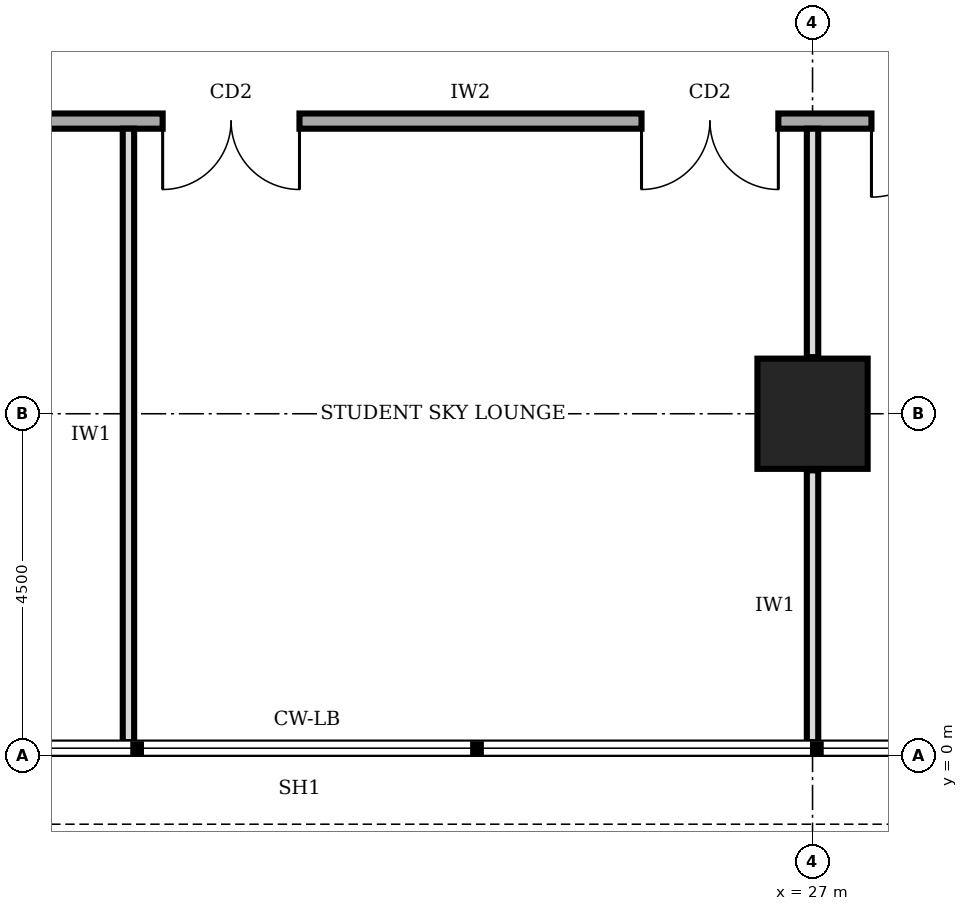
"""IFC4 building model, lengths in metres.
Left out: names, types, materials, properties, quantities, classifications, styles, units other than length and angle.
Written with IfcOpenShell. Run it as: python <this file> out.ifc"""

import sys

from ifc_helpers import new_model, si_unit, direction, frame, frame_2d, origin, origin_2d, place, context, subcontext, project, spatial, rectangle, extrude, element, fill, save


model = new_model("IFC4")
c1 = context("Model", 3, precision=1e-05, world=origin(), true_north=direction((0.0, 1.0)))
c2 = subcontext(c1, "Body", "Model", "MODEL_VIEW")
j1 = project(units=[si_unit("LENGTHUNIT", "METRE"), si_unit("PLANEANGLEUNIT", "RADIAN")], contexts=[c1])
p1 = place(None, origin())
s1 = spatial("IfcSite", under=j1, at=p1, CompositionType="ELEMENT")
p2 = place(p1, origin())
s2 = spatial("IfcBuilding", under=s1, at=p2, CompositionType="ELEMENT")
p3 = place(p2, frame((0.0, 0.0, 269.0)))
s3 = spatial("IfcBuildingStorey", under=s2, at=p3, CompositionType="ELEMENT", Elevation=269.0)
p4 = place(p3, frame((27.0, 4.5, 0.0), z_axis=(0.0, 0.0, 1.0), x_axis=(1.0, 0.0, 0.0)))
e1 = element("IfcColumn", 1, at=p4, inside=s3, PredefinedType="COLUMN", context=c2, shape_type="SweptSolid", body=[
    extrude(rectangle(XDim=1.45, YDim=1.45, at=origin_2d()), origin(), (0.0, 0.0, 1.0), 4.0),
])
p5 = place(p3, frame((11.9, 8.35, 0.0), z_axis=(0.0, 0.0, 1.0), x_axis=(1.0, 0.0, 0.0)))
e2 = element("IfcWall", 2, at=p5, inside=s3, PredefinedType="SOLIDWALL", context=c2, shape_type="SweptSolid", body=[
    extrude(rectangle(XDim=17.65, YDim=0.2, at=frame_2d((8.825, 0.0))), origin(), (0.0, 0.0, 1.0), 3.75),
])
p6 = place(p5, frame((2.05, 0.0, 0.0)))
e3 = element("IfcOpeningElement", 3, at=p6, cuts=e2, PredefinedType="OPENING", context=c2, shape_type="SweptSolid", body=[
    extrude(rectangle(XDim=1.8, YDim=2.1, at=frame_2d((0.9, 1.05))), frame((0.0, 0.11, 0.0), z_axis=(0.0, -1.0, 0.0), x_axis=(1.0, 0.0, 0.0)), (0.0, 0.0, 1.0), 0.22),
])
p7 = place(p5, frame((6.55, 0.0, 0.0)))
e4 = element("IfcOpeningElement", 4, at=p7, cuts=e2, PredefinedType="OPENING", context=c2, shape_type="SweptSolid", body=[
    extrude(rectangle(XDim=1.8, YDim=2.1, at=frame_2d((0.9, 1.05))), frame((0.0, 0.11, 0.0), z_axis=(0.0, -1.0, 0.0), x_axis=(1.0, 0.0, 0.0)), (0.0, 0.0, 1.0), 0.22),
])
p8 = place(p5, frame((12.85, 0.0, 0.0)))
e5 = element("IfcOpeningElement", 5, at=p8, cuts=e2, PredefinedType="OPENING", context=c2, shape_type="SweptSolid", body=[
    extrude(rectangle(XDim=1.8, YDim=2.1, at=frame_2d((0.9, 1.05))), frame((0.0, 0.11, 0.0), z_axis=(0.0, -1.0, 0.0), x_axis=(1.0, 0.0, 0.0)), (0.0, 0.0, 1.0), 0.22),
])
p9 = place(p5, frame((15.875, 0.0, 0.0)))
e6 = element("IfcOpeningElement", 6, at=p9, cuts=e2, PredefinedType="OPENING", context=c2, shape_type="SweptSolid", body=[
    extrude(rectangle(XDim=1.0, YDim=2.1, at=frame_2d((0.5, 1.05))), frame((0.0, 0.11, 0.0), z_axis=(0.0, -1.0, 0.0), x_axis=(1.0, 0.0, 0.0)), (0.0, 0.0, 1.0), 0.22),
])
p10 = place(p3, frame((18.0, 0.18, 0.0), z_axis=(0.0, 0.0, 1.0), x_axis=(0.0, 1.0, 0.0)))
e7 = element("IfcWall", 7, at=p10, inside=s3, PredefinedType="PARTITIONING", context=c2, shape_type="SweptSolid", body=[
    extrude(rectangle(XDim=8.07, YDim=0.15, at=frame_2d((4.035, 0.0))), origin(), (0.0, 0.0, 1.0), 3.75),
])
p11 = place(p3, frame((27.0, 0.18, 0.0), z_axis=(0.0, 0.0, 1.0), x_axis=(0.0, 1.0, 0.0)))
e8 = element("IfcWall", 8, at=p11, inside=s3, PredefinedType="PARTITIONING", context=c2, shape_type="SweptSolid", body=[
    extrude(rectangle(XDim=3.575, YDim=0.15, at=frame_2d((1.788, 0.0))), origin(), (0.0, 0.0, 1.0), 2.85),
])
p12 = place(p3, frame((27.0, 5.245, 0.0), z_axis=(0.0, 0.0, 1.0), x_axis=(0.0, 1.0, 0.0)))
e9 = element("IfcWall", 9, at=p12, inside=s3, PredefinedType="PARTITIONING", context=c2, shape_type="SweptSolid", body=[
    extrude(rectangle(XDim=3.005, YDim=0.15, at=frame_2d((1.502, 0.0))), origin(), (0.0, 0.0, 1.0), 2.85),
])
p13 = place(p7, frame((1.8, 0.0, 0.0), z_axis=(0.0, 0.0, 1.0), x_axis=(-1.0, 0.0, 0.0)))
e10 = element("IfcDoor", 10, at=p13, inside=s3, OperationType="DOUBLE_DOOR_SINGLE_SWING", PredefinedType="DOOR", context=c2, shape_type="SweptSolid", body=[
    extrude(rectangle(XDim=1.8, YDim=2.1, at=frame_2d((0.9, 1.05))), frame((0.0, 0.025, 0.0), z_axis=(0.0, -1.0, 0.0), x_axis=(1.0, 0.0, 0.0)), (0.0, 0.0, 1.0), 0.05),
])
fill(e4, e10)
p14 = place(p8, frame((1.8, 0.0, 0.0), z_axis=(0.0, 0.0, 1.0), x_axis=(-1.0, 0.0, 0.0)))
e11 = element("IfcDoor", 11, at=p14, inside=s3, OperationType="DOUBLE_DOOR_SINGLE_SWING", PredefinedType="DOOR", context=c2, shape_type="SweptSolid", body=[
    extrude(rectangle(XDim=1.8, YDim=2.1, at=frame_2d((0.9, 1.05))), frame((0.0, 0.025, 0.0), z_axis=(0.0, -1.0, 0.0), x_axis=(1.0, 0.0, 0.0)), (0.0, 0.0, 1.0), 0.05),
])
fill(e5, e11)
p15 = place(p9, frame((1.0, 0.0, 0.0), z_axis=(0.0, 0.0, 1.0), x_axis=(-1.0, 0.0, 0.0)))
e12 = element("IfcDoor", 12, at=p15, inside=s3, OperationType="SINGLE_SWING_RIGHT", PredefinedType="DOOR", context=c2, shape_type="SweptSolid", body=[
    extrude(rectangle(XDim=1.0, YDim=2.1, at=frame_2d((0.5, 1.05))), frame((0.0, 0.025, 0.0), z_axis=(0.0, -1.0, 0.0), x_axis=(1.0, 0.0, 0.0)), (0.0, 0.0, 1.0), 0.05),
])
fill(e6, e12)
save(model, sys.argv[1])
